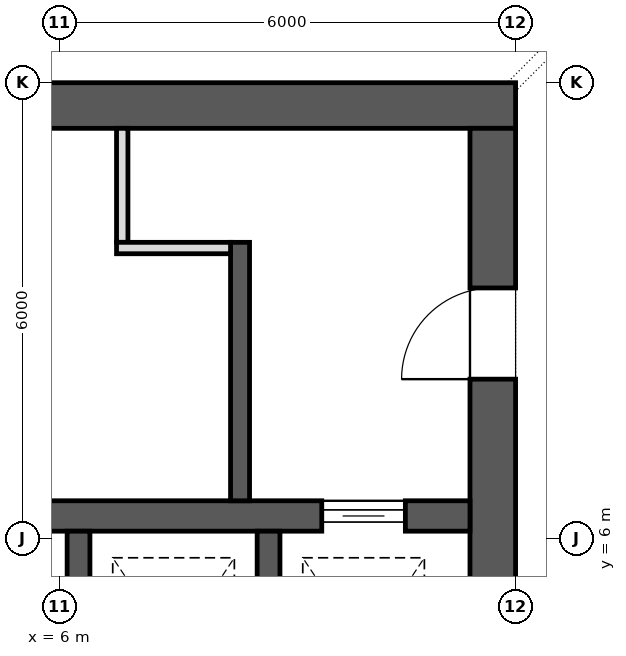
"""IFC4 building model, lengths in metres.
Left out: names, types, materials, properties, quantities, classifications, styles, units other than length and angle.
Written with IfcOpenShell. Run it as: python <this file> out.ifc"""

import sys

from ifc_helpers import new_model, si_unit, direction, frame, frame_2d, origin, place, context, subcontext, project, spatial, rectangle, extrude, element, fill, save


model = new_model("IFC4")
c1 = context("Model", 3, precision=1e-05, world=origin(), true_north=direction((0.0, 1.0)))
c2 = subcontext(c1, "Body", "Model", "MODEL_VIEW")
j1 = project(units=[si_unit("LENGTHUNIT", "METRE"), si_unit("PLANEANGLEUNIT", "RADIAN")], contexts=[c1])
p1 = place(None, origin())
s1 = spatial("IfcSite", under=j1, at=p1, CompositionType="ELEMENT")
p2 = place(p1, origin())
s2 = spatial("IfcBuilding", under=s1, at=p2, CompositionType="ELEMENT")
p3 = place(p2, frame((0.0, 0.0, -9.5)))
s3 = spatial("IfcBuildingStorey", under=s2, at=p3, CompositionType="ELEMENT", Elevation=-9.5)
p4 = place(p3, frame((-12.0, 11.7, 0.0), z_axis=(0.0, 0.0, 1.0), x_axis=(1.0, 0.0, 0.0)))
e1 = element("IfcWall", 1, at=p4, inside=s3, PredefinedType="SHEAR", context=c2, shape_type="SweptSolid", body=[
    extrude(rectangle(XDim=24.0, YDim=0.6, at=frame_2d((12.0, 0.0))), origin(), (0.0, 0.0, 1.0), 5.5),
])
p5 = place(p4, frame((11.6, 0.0, 0.0)))
e2 = element("IfcOpeningElement", 2, at=p5, cuts=e1, PredefinedType="OPENING", context=c2, shape_type="SweptSolid", body=[
    extrude(rectangle(XDim=0.8, YDim=2.1, at=frame_2d((0.4, 1.05))), frame((0.0, 0.312, 0.0), z_axis=(0.0, -1.0, 0.0), x_axis=(1.0, 0.0, 0.0)), (0.0, 0.0, 1.0), 0.624),
])
p6 = place(p3, frame((11.7, -11.4, 0.0), z_axis=(0.0, 0.0, 1.0), x_axis=(0.0, 1.0, 0.0)))
e3 = element("IfcWall", 3, at=p6, inside=s3, PredefinedType="SHEAR", context=c2, shape_type="SweptSolid", body=[
    extrude(rectangle(XDim=22.8, YDim=0.6, at=frame_2d((11.4, 0.0))), origin(), (0.0, 0.0, 1.0), 5.5),
])
p7 = place(p6, frame((10.2, 0.0, 0.0)))
e4 = element("IfcOpeningElement", 4, at=p7, cuts=e3, PredefinedType="OPENING", context=c2, shape_type="SweptSolid", body=[
    extrude(rectangle(XDim=2.4, YDim=2.1, at=frame_2d((1.2, 1.05))), frame((0.0, 0.312, 0.0), z_axis=(0.0, -1.0, 0.0), x_axis=(1.0, 0.0, 0.0)), (0.0, 0.0, 1.0), 0.624),
])
p8 = place(p6, frame((19.5, 0.0, 0.0)))
e5 = element("IfcOpeningElement", 5, at=p8, cuts=e3, PredefinedType="OPENING", context=c2, shape_type="SweptSolid", body=[
    extrude(rectangle(XDim=1.2, YDim=2.1, at=frame_2d((0.6, 1.05))), frame((0.0, 0.312, 0.0), z_axis=(0.0, -1.0, 0.0), x_axis=(1.0, 0.0, 0.0)), (0.0, 0.0, 1.0), 0.624),
])
p9 = place(p6, frame((2.1, 0.0, 0.0)))
e6 = element("IfcOpeningElement", 6, at=p9, cuts=e3, PredefinedType="OPENING", context=c2, shape_type="SweptSolid", body=[
    extrude(rectangle(XDim=1.2, YDim=2.1, at=frame_2d((0.6, 1.05))), frame((0.0, 0.312, 0.0), z_axis=(0.0, -1.0, 0.0), x_axis=(1.0, 0.0, 0.0)), (0.0, 0.0, 1.0), 0.624),
])
p10 = place(p3, frame((-11.4, 6.3, 0.0), z_axis=(0.0, 0.0, 1.0), x_axis=(1.0, 0.0, 0.0)))
e7 = element("IfcWall", 7, at=p10, inside=s3, PredefinedType="SHEAR", context=c2, shape_type="SweptSolid", body=[
    extrude(rectangle(XDim=22.8, YDim=0.4, at=frame_2d((11.4, 0.0))), origin(), (0.0, 0.0, 1.0), 5.5),
])
p11 = place(p10, frame((20.85, 0.0, 0.0)))
e8 = element("IfcOpeningElement", 8, at=p11, cuts=e7, PredefinedType="OPENING", context=c2, shape_type="SweptSolid", body=[
    extrude(rectangle(XDim=1.1, YDim=2.1, at=frame_2d((0.55, 1.05))), frame((0.0, 0.212, 0.0), z_axis=(0.0, -1.0, 0.0), x_axis=(1.0, 0.0, 0.0)), (0.0, 0.0, 1.0), 0.424),
])
for number, where, z_axis, x_axis in (
    (9, (6.25, 3.2, 0.0), (0.0, 0.0, 1.0), (0.0, 1.0, 0.0)),
    (10, (8.75, 3.2, 0.0), (0.0, 0.0, 1.0), (0.0, 1.0, 0.0)),
):
    element("IfcWall", number, at=place(p3, frame(where, z_axis=z_axis, x_axis=x_axis)), inside=s3, PredefinedType="SHEAR", context=c2, shape_type="SweptSolid", body=[
        extrude(rectangle(XDim=2.9, YDim=0.3, at=frame_2d((1.45, 0.0))), origin(), (0.0, 0.0, 1.0), 5.5),
    ])
p12 = place(p3, frame((8.375, 6.5, 0.0), z_axis=(0.0, 0.0, 1.0), x_axis=(0.0, 1.0, 0.0)))
e11 = element("IfcWall", 11, at=p12, inside=s3, PredefinedType="SHEAR", context=c2, shape_type="SweptSolid", body=[
    extrude(rectangle(XDim=3.4, YDim=0.25, at=frame_2d((1.7, 0.0))), origin(), (0.0, 0.0, 1.0), 5.05),
])
for number, where, z_axis, x_axis in (
    (12, (6.825, 9.9, 0.0), (0.0, 0.0, 1.0), (0.0, 1.0, 0.0)),
    (13, (6.75, 9.825, 0.0), (0.0, 0.0, 1.0), (1.0, 0.0, 0.0)),
):
    element("IfcWall", number, at=place(p3, frame(where, z_axis=z_axis, x_axis=x_axis)), inside=s3, PredefinedType="PARTITIONING", context=c2, shape_type="SweptSolid", body=[
        extrude(rectangle(XDim=1.5, YDim=0.15, at=frame_2d((0.75, 0.0))), origin(), (0.0, 0.0, 1.0), 5.05),
    ])
p13 = place(p11, origin())
e14 = element("IfcDoor", 14, at=p13, inside=s3, OperationType="SLIDING_TO_LEFT", PredefinedType="DOOR", context=c2, shape_type="SweptSolid", body=[
    extrude(rectangle(XDim=1.1, YDim=2.1, at=frame_2d((0.55, 1.05))), frame((0.0, 0.025, 0.0), z_axis=(0.0, -1.0, 0.0), x_axis=(1.0, 0.0, 0.0)), (0.0, 0.0, 1.0), 0.05),
])
fill(e8, e14)
p14 = place(p8, origin())
e15 = element("IfcDoor", 15, at=p14, inside=s3, OperationType="SINGLE_SWING_RIGHT", PredefinedType="DOOR", context=c2, shape_type="SweptSolid", body=[
    extrude(rectangle(XDim=1.2, YDim=2.1, at=frame_2d((0.6, 1.05))), frame((0.0, 0.025, 0.0), z_axis=(0.0, -1.0, 0.0), x_axis=(1.0, 0.0, 0.0)), (0.0, 0.0, 1.0), 0.05),
])
fill(e5, e15)
save(model, sys.argv[1])
